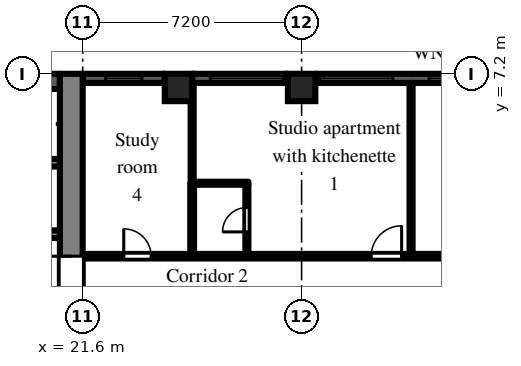
"""IFC4 building model, lengths in metres.
Left out: names, types, materials, properties, quantities, classifications, styles, units other than length and angle.
Written with IfcOpenShell. Run it as: python <this file> out.ifc"""

import sys

from ifc_helpers import new_model, si_unit, direction, frame, frame_2d, origin, origin_2d, place, context, subcontext, project, spatial, rectangle, extrude, element, fill, save


model = new_model("IFC4")
c1 = context("Model", 3, precision=1e-05, world=origin(), true_north=direction((0.0, 1.0)))
c2 = subcontext(c1, "Body", "Model", "MODEL_VIEW")
j1 = project(units=[si_unit("LENGTHUNIT", "METRE"), si_unit("PLANEANGLEUNIT", "RADIAN")], contexts=[c1])
p1 = place(None, origin())
s1 = spatial("IfcSite", under=j1, at=p1, CompositionType="ELEMENT")
p2 = place(p1, origin())
s2 = spatial("IfcBuilding", under=s1, at=p2, CompositionType="ELEMENT")
p3 = place(p2, frame((0.0, 0.0, 44.7)))
s3 = spatial("IfcBuildingStorey", under=s2, at=p3, CompositionType="ELEMENT", Elevation=44.7)
for number, where, z_axis, x_axis in (
    (1, (24.75, 6.75, 0.0), (0.0, 0.0, 1.0), (1.0, 0.0, 0.0)),
    (2, (28.8, 6.75, 0.0), (0.0, 0.0, 1.0), (1.0, 0.0, 0.0)),
):
    element("IfcColumn", number, at=place(p3, frame(where, z_axis=z_axis, x_axis=x_axis)), inside=s3, PredefinedType="COLUMN", context=c2, shape_type="SweptSolid", body=[
        extrude(rectangle(XDim=0.9, YDim=0.9, at=origin_2d()), origin(), (0.0, 0.0, 1.0), 3.0),
    ])
p4 = place(p3, frame((35.55, 7.05, 0.0), z_axis=(0.0, 0.0, 1.0), x_axis=(-1.0, 0.0, 0.0)))
e3 = element("IfcWall", 3, at=p4, inside=s3, PredefinedType="SOLIDWALL", context=c2, shape_type="SweptSolid", body=[
    extrude(rectangle(XDim=6.3, YDim=0.3, at=frame_2d((3.15, 0.0))), origin(), (0.0, 0.0, 1.0), 2.1),
])
p5 = place(p4, frame((0.15, 0.0, 0.2)))
e4 = element("IfcOpeningElement", 4, at=p5, cuts=e3, PredefinedType="OPENING", context=c2, shape_type="SweptSolid", body=[
    extrude(rectangle(XDim=2.4, YDim=1.85, at=frame_2d((1.2, 0.925))), frame((0.0, 0.16, 0.0), z_axis=(0.0, -1.0, 0.0), x_axis=(1.0, 0.0, 0.0)), (0.0, 0.0, 1.0), 0.32),
])
p6 = place(p4, frame((3.75, 0.0, 0.2)))
e5 = element("IfcOpeningElement", 5, at=p6, cuts=e3, PredefinedType="OPENING", context=c2, shape_type="SweptSolid", body=[
    extrude(rectangle(XDim=2.4, YDim=1.85, at=frame_2d((1.2, 0.925))), frame((0.0, 0.16, 0.0), z_axis=(0.0, -1.0, 0.0), x_axis=(1.0, 0.0, 0.0)), (0.0, 0.0, 1.0), 0.32),
])
p7 = place(p3, frame((28.35, 7.05, 0.0), z_axis=(0.0, 0.0, 1.0), x_axis=(-1.0, 0.0, 0.0)))
e6 = element("IfcWall", 6, at=p7, inside=s3, PredefinedType="SOLIDWALL", context=c2, shape_type="SweptSolid", body=[
    extrude(rectangle(XDim=3.15, YDim=0.3, at=frame_2d((1.575, 0.0))), origin(), (0.0, 0.0, 1.0), 2.1),
])
p8 = place(p7, frame((0.15, 0.0, 0.2)))
e7 = element("IfcOpeningElement", 7, at=p8, cuts=e6, PredefinedType="OPENING", context=c2, shape_type="SweptSolid", body=[
    extrude(rectangle(XDim=2.4, YDim=1.85, at=frame_2d((1.2, 0.925))), frame((0.0, 0.16, 0.0), z_axis=(0.0, -1.0, 0.0), x_axis=(1.0, 0.0, 0.0)), (0.0, 0.0, 1.0), 0.32),
])
p9 = place(p3, frame((24.3, 7.05, 0.0), z_axis=(0.0, 0.0, 1.0), x_axis=(-1.0, 0.0, 0.0)))
e8 = element("IfcWall", 8, at=p9, inside=s3, PredefinedType="SOLIDWALL", context=c2, shape_type="SweptSolid", body=[
    extrude(rectangle(XDim=2.7, YDim=0.3, at=frame_2d((1.35, 0.0))), origin(), (0.0, 0.0, 1.0), 2.1),
])
p10 = place(p9, frame((0.75, 0.0, 0.2)))
e9 = element("IfcOpeningElement", 9, at=p10, cuts=e8, PredefinedType="OPENING", context=c2, shape_type="SweptSolid", body=[
    extrude(rectangle(XDim=1.2, YDim=1.85, at=frame_2d((0.6, 0.925))), frame((0.0, 0.16, 0.0), z_axis=(0.0, -1.0, 0.0), x_axis=(1.0, 0.0, 0.0)), (0.0, 0.0, 1.0), 0.32),
])
p11 = place(p3, frame((21.225, -7.2, 0.0), z_axis=(0.0, 0.0, 1.0), x_axis=(0.0, 1.0, 0.0)))
e10 = element("IfcWall", 10, at=p11, inside=s3, PredefinedType="SHEAR", context=c2, shape_type="SweptSolid", body=[
    extrude(rectangle(XDim=14.4, YDim=0.75, at=frame_2d((7.2, 0.0))), origin(), (0.0, 0.0, 1.0), 2.575),
])
p12 = place(p11, frame((6.0, 0.0, 0.0)))
e11 = element("IfcOpeningElement", 11, at=p12, cuts=e10, PredefinedType="OPENING", context=c2, shape_type="SweptSolid", body=[
    extrude(rectangle(XDim=2.4, YDim=2.2, at=frame_2d((1.2, 1.1))), frame((0.0, 0.385, 0.0), z_axis=(0.0, -1.0, 0.0), x_axis=(1.0, 0.0, 0.0)), (0.0, 0.0, 1.0), 0.77),
])
p13 = place(p3, frame((7.9, 6.95, 0.0), z_axis=(0.0, 0.0, 1.0), x_axis=(1.0, 0.0, 0.0)))
e12 = element("IfcWall", 12, at=p13, inside=s3, PredefinedType="SHEAR", context=c2, shape_type="SweptSolid", body=[
    extrude(rectangle(XDim=12.95, YDim=0.5, at=frame_2d((6.475, 0.0))), origin(), (0.0, 0.0, 1.0), 2.575),
])
p14 = place(p3, frame((7.9, 1.925, 0.0), z_axis=(0.0, 0.0, 1.0), x_axis=(1.0, 0.0, 0.0)))
e13 = element("IfcWall", 13, at=p14, inside=s3, PredefinedType="SHEAR", context=c2, shape_type="SweptSolid", body=[
    extrude(rectangle(XDim=12.95, YDim=0.25, at=frame_2d((6.475, 0.0))), origin(), (0.0, 0.0, 1.0), 2.575),
])
p15 = place(p14, frame((0.525, 0.0, 0.0)))
e14 = element("IfcOpeningElement", 14, at=p15, cuts=e13, PredefinedType="OPENING", context=c2, shape_type="SweptSolid", body=[
    extrude(rectangle(XDim=0.9, YDim=2.1, at=frame_2d((0.45, 1.05))), frame((0.0, 0.135, 0.0), z_axis=(0.0, -1.0, 0.0), x_axis=(1.0, 0.0, 0.0)), (0.0, 0.0, 1.0), 0.27),
])
p16 = place(p14, frame((2.625, 0.0, 0.0)))
e15 = element("IfcOpeningElement", 15, at=p16, cuts=e13, PredefinedType="OPENING", context=c2, shape_type="SweptSolid", body=[
    extrude(rectangle(XDim=1.1, YDim=2.1, at=frame_2d((0.55, 1.05))), frame((0.0, 0.135, 0.0), z_axis=(0.0, -1.0, 0.0), x_axis=(1.0, 0.0, 0.0)), (0.0, 0.0, 1.0), 0.27),
])
p17 = place(p14, frame((4.925, 0.0, 0.0)))
e16 = element("IfcOpeningElement", 16, at=p17, cuts=e13, PredefinedType="OPENING", context=c2, shape_type="SweptSolid", body=[
    extrude(rectangle(XDim=0.9, YDim=2.1, at=frame_2d((0.45, 1.05))), frame((0.0, 0.135, 0.0), z_axis=(0.0, -1.0, 0.0), x_axis=(1.0, 0.0, 0.0)), (0.0, 0.0, 1.0), 0.27),
])
p18 = place(p14, frame((8.225, 0.0, 0.0)))
e17 = element("IfcOpeningElement", 17, at=p18, cuts=e13, PredefinedType="OPENING", context=c2, shape_type="SweptSolid", body=[
    extrude(rectangle(XDim=0.9, YDim=2.1, at=frame_2d((0.45, 1.05))), frame((0.0, 0.135, 0.0), z_axis=(0.0, -1.0, 0.0), x_axis=(1.0, 0.0, 0.0)), (0.0, 0.0, 1.0), 0.27),
])
p19 = place(p3, frame((12.3, 4.275, 0.0), z_axis=(0.0, 0.0, 1.0), x_axis=(1.0, 0.0, 0.0)))
e18 = element("IfcWall", 18, at=p19, inside=s3, PredefinedType="SHEAR", context=c2, shape_type="SweptSolid", body=[
    extrude(rectangle(XDim=8.55, YDim=0.25, at=frame_2d((4.275, 0.0))), origin(), (0.0, 0.0, 1.0), 2.575),
])
p20 = place(p3, frame((21.6, 1.2, 0.0), z_axis=(0.0, 0.0, 1.0), x_axis=(1.0, 0.0, 0.0)))
e19 = element("IfcWall", 19, at=p20, inside=s3, PredefinedType="PARTITIONING", context=c2, shape_type="SweptSolid", body=[
    extrude(rectangle(XDim=14.9, YDim=0.15, at=frame_2d((7.45, 0.0))), origin(), (0.0, 0.0, 1.0), 2.575),
])
p21 = place(p20, frame((1.35, 0.0, 0.0)))
e20 = element("IfcOpeningElement", 20, at=p21, cuts=e19, PredefinedType="OPENING", context=c2, shape_type="SweptSolid", body=[
    extrude(rectangle(XDim=0.9, YDim=2.1, at=frame_2d((0.45, 1.05))), frame((0.0, 0.085, 0.0), z_axis=(0.0, -1.0, 0.0), x_axis=(1.0, 0.0, 0.0)), (0.0, 0.0, 1.0), 0.17),
])
p22 = place(p20, frame((9.49, 0.0, 0.0)))
e21 = element("IfcOpeningElement", 21, at=p22, cuts=e19, PredefinedType="OPENING", context=c2, shape_type="SweptSolid", body=[
    extrude(rectangle(XDim=1.0, YDim=2.1, at=frame_2d((0.5, 1.05))), frame((0.0, 0.085, 0.0), z_axis=(0.0, -1.0, 0.0), x_axis=(1.0, 0.0, 0.0)), (0.0, 0.0, 1.0), 0.17),
])
p23 = place(p20, frame((11.95, 0.0, 0.0)))
e22 = element("IfcOpeningElement", 22, at=p23, cuts=e19, PredefinedType="OPENING", context=c2, shape_type="SweptSolid", body=[
    extrude(rectangle(XDim=1.8, YDim=2.1, at=frame_2d((0.9, 1.05))), frame((0.0, 0.085, 0.0), z_axis=(0.0, -1.0, 0.0), x_axis=(1.0, 0.0, 0.0)), (0.0, 0.0, 1.0), 0.17),
])
p24 = place(p3, frame((25.2, 1.275, 0.0), z_axis=(0.0, 0.0, 1.0), x_axis=(0.0, 1.0, 0.0)))
e23 = element("IfcWall", 23, at=p24, inside=s3, PredefinedType="PARTITIONING", context=c2, shape_type="SweptSolid", body=[
    extrude(rectangle(XDim=2.325, YDim=0.125, at=frame_2d((1.163, 0.0))), origin(), (0.0, 0.0, 1.0), 2.575),
])
p25 = place(p3, frame((25.2, 3.6, 0.0), z_axis=(0.0, 0.0, 1.0), x_axis=(0.0, 1.0, 0.0)))
e24 = element("IfcWall", 24, at=p25, inside=s3, PredefinedType="PARTITIONING", context=c2, shape_type="SweptSolid", body=[
    extrude(rectangle(XDim=3.3, YDim=0.1, at=frame_2d((1.65, 0.0))), origin(), (0.0, 0.0, 1.0), 2.575),
])
p26 = place(p3, frame((25.262, 3.6, 0.0), z_axis=(0.0, 0.0, 1.0), x_axis=(1.0, 0.0, 0.0)))
e25 = element("IfcWall", 25, at=p26, inside=s3, PredefinedType="PARTITIONING", context=c2, shape_type="SweptSolid", body=[
    extrude(rectangle(XDim=1.788, YDim=0.1, at=frame_2d((0.894, 0.0))), origin(), (0.0, 0.0, 1.0), 2.575),
])
p27 = place(p3, frame((27.0, 1.275, 0.0), z_axis=(0.0, 0.0, 1.0), x_axis=(0.0, 1.0, 0.0)))
e26 = element("IfcWall", 26, at=p27, inside=s3, PredefinedType="PARTITIONING", context=c2, shape_type="SweptSolid", body=[
    extrude(rectangle(XDim=2.275, YDim=0.1, at=frame_2d((1.138, 0.0))), origin(), (0.0, 0.0, 1.0), 2.575),
])
p28 = place(p27, frame((0.725, 0.0, 0.0)))
e27 = element("IfcOpeningElement", 27, at=p28, cuts=e26, PredefinedType="OPENING", context=c2, shape_type="SweptSolid", body=[
    extrude(rectangle(XDim=0.8, YDim=2.1, at=frame_2d((0.4, 1.05))), frame((0.0, 0.06, 0.0), z_axis=(0.0, -1.0, 0.0), x_axis=(1.0, 0.0, 0.0)), (0.0, 0.0, 1.0), 0.12),
])
p29 = place(p3, frame((32.4, 1.275, 0.0), z_axis=(0.0, 0.0, 1.0), x_axis=(0.0, 1.0, 0.0)))
e28 = element("IfcWall", 28, at=p29, inside=s3, PredefinedType="PARTITIONING", context=c2, shape_type="SweptSolid", body=[
    extrude(rectangle(XDim=5.625, YDim=0.1, at=frame_2d((2.812, 0.0))), origin(), (0.0, 0.0, 1.0), 2.575),
])
p30 = place(p5, origin())
e29 = element("IfcWindow", 29, at=p30, inside=s3, PartitioningType="SINGLE_PANEL", PredefinedType="WINDOW", context=c2, shape_type="SweptSolid", body=[
    extrude(rectangle(XDim=2.4, YDim=1.85, at=frame_2d((1.2, 0.925))), frame((0.0, 0.03, 0.0), z_axis=(0.0, -1.0, 0.0), x_axis=(1.0, 0.0, 0.0)), (0.0, 0.0, 1.0), 0.06),
])
fill(e4, e29)
p31 = place(p6, origin())
e30 = element("IfcWindow", 30, at=p31, inside=s3, PartitioningType="SINGLE_PANEL", PredefinedType="WINDOW", context=c2, shape_type="SweptSolid", body=[
    extrude(rectangle(XDim=2.4, YDim=1.85, at=frame_2d((1.2, 0.925))), frame((0.0, 0.03, 0.0), z_axis=(0.0, -1.0, 0.0), x_axis=(1.0, 0.0, 0.0)), (0.0, 0.0, 1.0), 0.06),
])
fill(e5, e30)
p32 = place(p8, origin())
e31 = element("IfcWindow", 31, at=p32, inside=s3, PartitioningType="SINGLE_PANEL", PredefinedType="WINDOW", context=c2, shape_type="SweptSolid", body=[
    extrude(rectangle(XDim=2.4, YDim=1.85, at=frame_2d((1.2, 0.925))), frame((0.0, 0.03, 0.0), z_axis=(0.0, -1.0, 0.0), x_axis=(1.0, 0.0, 0.0)), (0.0, 0.0, 1.0), 0.06),
])
fill(e7, e31)
p33 = place(p10, origin())
e32 = element("IfcWindow", 32, at=p33, inside=s3, PartitioningType="SINGLE_PANEL", PredefinedType="WINDOW", context=c2, shape_type="SweptSolid", body=[
    extrude(rectangle(XDim=1.2, YDim=1.85, at=frame_2d((0.6, 0.925))), frame((0.0, 0.03, 0.0), z_axis=(0.0, -1.0, 0.0), x_axis=(1.0, 0.0, 0.0)), (0.0, 0.0, 1.0), 0.06),
])
fill(e9, e32)
p34 = place(p12, origin())
e33 = element("IfcDoor", 33, at=p34, inside=s3, OperationType="DOUBLE_DOOR_DOUBLE_SWING", PredefinedType="DOOR", context=c2, shape_type="SweptSolid", body=[
    extrude(rectangle(XDim=2.4, YDim=2.2, at=frame_2d((1.2, 1.1))), frame((0.0, 0.025, 0.0), z_axis=(0.0, -1.0, 0.0), x_axis=(1.0, 0.0, 0.0)), (0.0, 0.0, 1.0), 0.05),
])
fill(e11, e33)
p35 = place(p21, origin())
e34 = element("IfcDoor", 34, at=p35, inside=s3, OperationType="SINGLE_SWING_LEFT", PredefinedType="DOOR", context=c2, shape_type="SweptSolid", body=[
    extrude(rectangle(XDim=0.9, YDim=2.1, at=frame_2d((0.45, 1.05))), frame((0.0, 0.025, 0.0), z_axis=(0.0, -1.0, 0.0), x_axis=(1.0, 0.0, 0.0)), (0.0, 0.0, 1.0), 0.05),
])
fill(e20, e34)
p36 = place(p28, origin())
e35 = element("IfcDoor", 35, at=p36, inside=s3, OperationType="SINGLE_SWING_LEFT", PredefinedType="DOOR", context=c2, shape_type="SweptSolid", body=[
    extrude(rectangle(XDim=0.8, YDim=2.1, at=frame_2d((0.4, 1.05))), frame((0.0, 0.025, 0.0), z_axis=(0.0, -1.0, 0.0), x_axis=(1.0, 0.0, 0.0)), (0.0, 0.0, 1.0), 0.05),
])
fill(e27, e35)
p37 = place(p22, origin())
e36 = element("IfcDoor", 36, at=p37, inside=s3, OperationType="SINGLE_SWING_RIGHT", PredefinedType="DOOR", context=c2, shape_type="SweptSolid", body=[
    extrude(rectangle(XDim=1.0, YDim=2.1, at=frame_2d((0.5, 1.05))), frame((0.0, 0.025, 0.0), z_axis=(0.0, -1.0, 0.0), x_axis=(1.0, 0.0, 0.0)), (0.0, 0.0, 1.0), 0.05),
])
fill(e21, e36)
save(model, sys.argv[1])
